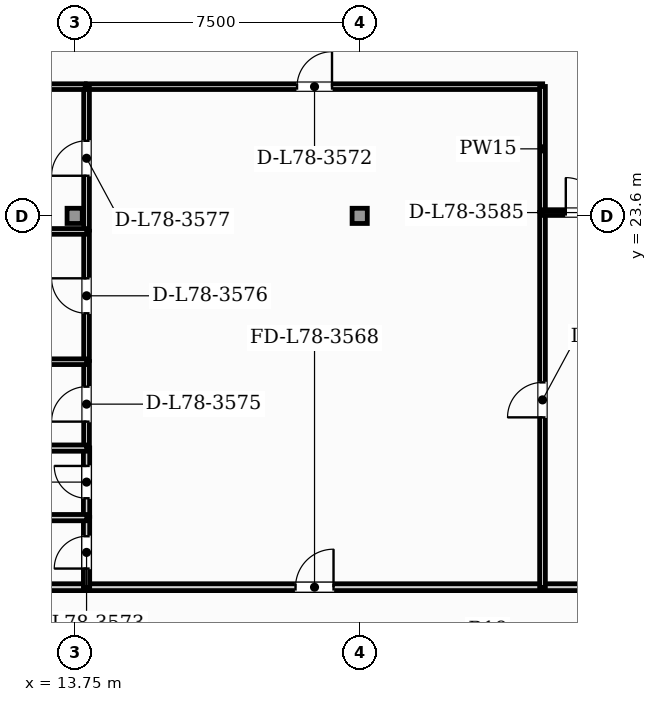
"""IFC4 building model, lengths in metres.
Left out: names, types, materials, properties, quantities, classifications, styles, units other than length and angle.
Written with IfcOpenShell. Run it as: python <this file> out.ifc"""

import sys

from ifc_helpers import new_model, si_unit, direction, frame, frame_2d, origin, origin_2d, place, context, subcontext, project, spatial, rectangle, hollow_rectangle, extrude, element, fill, save


model = new_model("IFC4")
c1 = context("Model", 3, precision=1e-05, world=origin(), true_north=direction((0.0, 1.0)))
c2 = subcontext(c1, "Body", "Model", "MODEL_VIEW")
j1 = project(units=[si_unit("LENGTHUNIT", "METRE"), si_unit("PLANEANGLEUNIT", "RADIAN")], contexts=[c1])
p1 = place(None, origin())
s1 = spatial("IfcSite", under=j1, at=p1, CompositionType="ELEMENT")
p2 = place(p1, origin())
s2 = spatial("IfcBuilding", under=s1, at=p2, CompositionType="ELEMENT")
p3 = place(p2, frame((0.0, 0.0, 316.9)))
s3 = spatial("IfcBuildingStorey", under=s2, at=p3, CompositionType="ELEMENT", Elevation=316.9)
for number, where, z_axis, x_axis in (
    (1, (13.75, 23.6, 0.0), (0.0, 0.0, 1.0), (1.0, 0.0, 0.0)),
    (2, (21.25, 23.6, 0.0), (0.0, 0.0, 1.0), (1.0, 0.0, 0.0)),
):
    element("IfcColumn", number, at=place(p3, frame(where, z_axis=z_axis, x_axis=x_axis)), inside=s3, PredefinedType="COLUMN", context=c2, shape_type="SweptSolid", body=[
        extrude(hollow_rectangle(XDim=0.4, YDim=0.4, WallThickness=0.02, at=origin_2d()), origin(), (0.0, 0.0, 1.0), 3.85),
    ])
p4 = place(p3, frame((14.058, 13.83, 0.0), z_axis=(0.0, 0.0, 1.0), x_axis=(1.0, 0.0, 0.0)))
e3 = element("IfcWall", 3, at=p4, inside=s3, PredefinedType="PARTITIONING", context=c2, shape_type="SweptSolid", body=[
    extrude(rectangle(XDim=12.007, YDim=0.18, at=frame_2d((6.003, 0.0))), origin(), (0.0, 0.0, 1.0), 3.65),
])
p5 = place(p4, frame((5.503, 0.0, 0.0)))
e4 = element("IfcOpeningElement", 4, at=p5, cuts=e3, PredefinedType="OPENING", context=c2, shape_type="SweptSolid", body=[
    extrude(rectangle(XDim=1.0, YDim=2.15, at=frame_2d((0.5, 1.075))), frame((0.0, 0.1, 0.0), z_axis=(0.0, -1.0, 0.0), x_axis=(1.0, 0.0, 0.0)), (0.0, 0.0, 1.0), 0.2),
])
p6 = place(p3, frame((26.095, 13.83, 0.0), z_axis=(0.0, 0.0, 1.0), x_axis=(1.0, 0.0, 0.0)))
e5 = element("IfcWall", 5, at=p6, inside=s3, PredefinedType="PARTITIONING", context=c2, shape_type="SweptSolid", body=[
    extrude(rectangle(XDim=5.31, YDim=0.18, at=frame_2d((2.655, 0.0))), origin(), (0.0, 0.0, 1.0), 3.65),
])
p7 = place(p6, frame((2.155, 0.0, 0.0)))
e6 = element("IfcOpeningElement", 6, at=p7, cuts=e5, PredefinedType="OPENING", context=c2, shape_type="SweptSolid", body=[
    extrude(rectangle(XDim=1.0, YDim=2.15, at=frame_2d((0.5, 1.075))), frame((0.0, 0.1, 0.0), z_axis=(0.0, -1.0, 0.0), x_axis=(1.0, 0.0, 0.0)), (0.0, 0.0, 1.0), 0.2),
])
p8 = place(p3, frame((9.143, 13.83, 0.0), z_axis=(0.0, 0.0, 1.0), x_axis=(1.0, 0.0, 0.0)))
e7 = element("IfcWall", 7, at=p8, inside=s3, PredefinedType="PARTITIONING", context=c2, shape_type="SweptSolid", body=[
    extrude(rectangle(XDim=4.885, YDim=0.18, at=frame_2d((2.443, 0.0))), origin(), (0.0, 0.0, 1.0), 3.65),
])
p9 = place(p3, frame((26.06, 13.825, 0.0), z_axis=(0.0, 0.0, 1.0), x_axis=(0.0, 1.0, 0.0)))
e8 = element("IfcWall", 8, at=p9, inside=s3, PredefinedType="PARTITIONING", context=c2, shape_type="SweptSolid", body=[
    extrude(rectangle(XDim=9.867, YDim=0.15, at=frame_2d((4.934, 0.0))), origin(), (0.0, 0.0, 1.0), 3.65),
])
p10 = place(p9, frame((4.473, 0.0, 0.0)))
e9 = element("IfcOpeningElement", 9, at=p10, cuts=e8, PredefinedType="OPENING", context=c2, shape_type="SweptSolid", body=[
    extrude(rectangle(XDim=0.92, YDim=2.1, at=frame_2d((0.46, 1.05))), frame((0.0, 0.085, 0.0), z_axis=(0.0, -1.0, 0.0), x_axis=(1.0, 0.0, 0.0)), (0.0, 0.0, 1.0), 0.17),
])
p11 = place(p3, frame((14.058, 27.0, 0.0), z_axis=(0.0, 0.0, 1.0), x_axis=(1.0, 0.0, 0.0)))
e10 = element("IfcWall", 10, at=p11, inside=s3, PredefinedType="PARTITIONING", context=c2, shape_type="SweptSolid", body=[
    extrude(rectangle(XDim=12.007, YDim=0.15, at=frame_2d((6.003, 0.0))), origin(), (0.0, 0.0, 1.0), 3.65),
])
p12 = place(p11, frame((5.543, 0.0, 0.0)))
e11 = element("IfcOpeningElement", 11, at=p12, cuts=e10, PredefinedType="OPENING", context=c2, shape_type="SweptSolid", body=[
    extrude(rectangle(XDim=0.92, YDim=2.1, at=frame_2d((0.46, 1.05))), frame((0.0, 0.085, 0.0), z_axis=(0.0, -1.0, 0.0), x_axis=(1.0, 0.0, 0.0)), (0.0, 0.0, 1.0), 0.17),
])
p13 = place(p3, frame((26.06, 23.722, 0.0), z_axis=(0.0, 0.0, 1.0), x_axis=(0.0, 1.0, 0.0)))
e12 = element("IfcWall", 12, at=p13, inside=s3, PredefinedType="PARTITIONING", context=c2, shape_type="SweptSolid", body=[
    extrude(rectangle(XDim=3.283, YDim=0.15, at=frame_2d((1.642, 0.0))), origin(), (0.0, 0.0, 1.0), 3.65),
])
p14 = place(p3, frame((14.063, 13.825, 0.0), z_axis=(0.0, 0.0, 1.0), x_axis=(0.0, 1.0, 0.0)))
e13 = element("IfcWall", 13, at=p14, inside=s3, PredefinedType="PLUMBINGWALL", context=c2, shape_type="SweptSolid", body=[
    extrude(rectangle(XDim=1.84, YDim=0.165, at=frame_2d((0.92, 0.0))), origin(), (0.0, 0.0, 1.0), 3.65),
])
p15 = place(p14, frame((0.495, 0.0, 0.0)))
e14 = element("IfcOpeningElement", 14, at=p15, cuts=e13, PredefinedType="OPENING", context=c2, shape_type="SweptSolid", body=[
    extrude(rectangle(XDim=0.85, YDim=2.1, at=frame_2d((0.425, 1.05))), frame((0.0, 0.093, 0.0), z_axis=(0.0, -1.0, 0.0), x_axis=(1.0, 0.0, 0.0)), (0.0, 0.0, 1.0), 0.185),
])
p16 = place(p3, frame((14.063, 15.695, 0.0), z_axis=(0.0, 0.0, 1.0), x_axis=(0.0, 1.0, 0.0)))
e15 = element("IfcWall", 15, at=p16, inside=s3, PredefinedType="PLUMBINGWALL", context=c2, shape_type="SweptSolid", body=[
    extrude(rectangle(XDim=1.8, YDim=0.165, at=frame_2d((0.9, 0.0))), origin(), (0.0, 0.0, 1.0), 3.65),
])
p17 = place(p16, frame((0.475, 0.0, 0.0)))
e16 = element("IfcOpeningElement", 16, at=p17, cuts=e15, PredefinedType="OPENING", context=c2, shape_type="SweptSolid", body=[
    extrude(rectangle(XDim=0.85, YDim=2.1, at=frame_2d((0.425, 1.05))), frame((0.0, 0.093, 0.0), z_axis=(0.0, -1.0, 0.0), x_axis=(1.0, 0.0, 0.0)), (0.0, 0.0, 1.0), 0.185),
])
p18 = place(p3, frame((14.063, 17.525, 0.0), z_axis=(0.0, 0.0, 1.0), x_axis=(0.0, 1.0, 0.0)))
e17 = element("IfcWall", 17, at=p18, inside=s3, PredefinedType="PARTITIONING", context=c2, shape_type="SweptSolid", body=[
    extrude(rectangle(XDim=2.243, YDim=0.15, at=frame_2d((1.122, 0.0))), origin(), (0.0, 0.0, 1.0), 3.65),
])
p19 = place(p18, frame((0.661, 0.0, 0.0)))
e18 = element("IfcOpeningElement", 18, at=p19, cuts=e17, PredefinedType="OPENING", context=c2, shape_type="SweptSolid", body=[
    extrude(rectangle(XDim=0.92, YDim=2.1, at=frame_2d((0.46, 1.05))), frame((0.0, 0.085, 0.0), z_axis=(0.0, -1.0, 0.0), x_axis=(1.0, 0.0, 0.0)), (0.0, 0.0, 1.0), 0.17),
])
p20 = place(p3, frame((14.063, 19.798, 0.0), z_axis=(0.0, 0.0, 1.0), x_axis=(0.0, 1.0, 0.0)))
e19 = element("IfcWall", 19, at=p20, inside=s3, PredefinedType="PARTITIONING", context=c2, shape_type="SweptSolid", body=[
    extrude(rectangle(XDim=3.398, YDim=0.15, at=frame_2d((1.699, 0.0))), origin(), (0.0, 0.0, 1.0), 3.65),
])
p21 = place(p20, frame((1.239, 0.0, 0.0)))
e20 = element("IfcOpeningElement", 20, at=p21, cuts=e19, PredefinedType="OPENING", context=c2, shape_type="SweptSolid", body=[
    extrude(rectangle(XDim=0.92, YDim=2.1, at=frame_2d((0.46, 1.05))), frame((0.0, 0.085, 0.0), z_axis=(0.0, -1.0, 0.0), x_axis=(1.0, 0.0, 0.0)), (0.0, 0.0, 1.0), 0.17),
])
p22 = place(p3, frame((14.063, 23.226, 0.0), z_axis=(0.0, 0.0, 1.0), x_axis=(0.0, 1.0, 0.0)))
e21 = element("IfcWall", 21, at=p22, inside=s3, PredefinedType="PARTITIONING", context=c2, shape_type="SweptSolid", body=[
    extrude(rectangle(XDim=3.779, YDim=0.15, at=frame_2d((1.889, 0.0))), origin(), (0.0, 0.0, 1.0), 3.65),
])
p23 = place(p22, frame((1.429, 0.0, 0.0)))
e22 = element("IfcOpeningElement", 22, at=p23, cuts=e21, PredefinedType="OPENING", context=c2, shape_type="SweptSolid", body=[
    extrude(rectangle(XDim=0.92, YDim=2.1, at=frame_2d((0.46, 1.05))), frame((0.0, 0.085, 0.0), z_axis=(0.0, -1.0, 0.0), x_axis=(1.0, 0.0, 0.0)), (0.0, 0.0, 1.0), 0.17),
])
p24 = place(p3, frame((26.055, 23.687, 0.0), z_axis=(0.0, 0.0, 1.0), x_axis=(1.0, 0.0, 0.0)))
e23 = element("IfcWall", 23, at=p24, inside=s3, PredefinedType="PARTITIONING", context=c2, shape_type="SweptSolid", body=[
    extrude(rectangle(XDim=5.39, YDim=0.15, at=frame_2d((2.695, 0.0))), origin(), (0.0, 0.0, 1.0), 3.117),
])
p25 = place(p24, frame((0.618, 0.0, 0.0)))
e24 = element("IfcOpeningElement", 24, at=p25, cuts=e23, PredefinedType="OPENING", context=c2, shape_type="SweptSolid", body=[
    extrude(rectangle(XDim=0.92, YDim=2.1, at=frame_2d((0.46, 1.05))), frame((0.0, 0.085, 0.0), z_axis=(0.0, -1.0, 0.0), x_axis=(1.0, 0.0, 0.0)), (0.0, 0.0, 1.0), 0.17),
])
p26 = place(p3, frame((9.143, 27.0, 0.0), z_axis=(0.0, 0.0, 1.0), x_axis=(1.0, 0.0, 0.0)))
e25 = element("IfcWall", 25, at=p26, inside=s3, PredefinedType="PARTITIONING", context=c2, shape_type="SweptSolid", body=[
    extrude(rectangle(XDim=4.885, YDim=0.15, at=frame_2d((2.443, 0.0))), origin(), (0.0, 0.0, 1.0), 3.65),
])
p27 = place(p26, frame((1.983, 0.0, 0.0)))
e26 = element("IfcOpeningElement", 26, at=p27, cuts=e25, PredefinedType="OPENING", context=c2, shape_type="SweptSolid", body=[
    extrude(rectangle(XDim=0.92, YDim=2.1, at=frame_2d((0.46, 1.05))), frame((0.0, 0.085, 0.0), z_axis=(0.0, -1.0, 0.0), x_axis=(1.0, 0.0, 0.0)), (0.0, 0.0, 1.0), 0.17),
])
for number, where, z_axis, x_axis in (
    (27, (9.143, 15.66, 0.0), (0.0, 0.0, 1.0), (1.0, 0.0, 0.0)),
    (28, (9.143, 17.49, 0.0), (0.0, 0.0, 1.0), (1.0, 0.0, 0.0)),
):
    element("IfcWall", number, at=place(p3, frame(where, z_axis=z_axis, x_axis=x_axis)), inside=s3, PredefinedType="PLUMBINGWALL", context=c2, shape_type="SweptSolid", body=[
        extrude(rectangle(XDim=4.926, YDim=0.165, at=frame_2d((2.463, 0.0))), origin(), (0.0, 0.0, 1.0), 3.65),
    ])
for number, where, z_axis, x_axis in (
    (29, (9.143, 19.763, 0.0), (0.0, 0.0, 1.0), (1.0, 0.0, 0.0)),
    (30, (9.143, 23.191, 0.0), (0.0, 0.0, 1.0), (1.0, 0.0, 0.0)),
):
    element("IfcWall", number, at=place(p3, frame(where, z_axis=z_axis, x_axis=x_axis)), inside=s3, PredefinedType="PARTITIONING", context=c2, shape_type="SweptSolid", body=[
        extrude(rectangle(XDim=4.926, YDim=0.15, at=frame_2d((2.463, 0.0))), origin(), (0.0, 0.0, 1.0), 3.65),
    ])
p28 = place(p5, origin())
e31 = element("IfcDoor", 31, at=p28, inside=s3, OperationType="SINGLE_SWING_RIGHT", PredefinedType="DOOR", context=c2, shape_type="SweptSolid", body=[
    extrude(rectangle(XDim=1.0, YDim=2.15, at=frame_2d((0.5, 1.075))), frame((0.0, 0.025, 0.0), z_axis=(0.0, -1.0, 0.0), x_axis=(1.0, 0.0, 0.0)), (0.0, 0.0, 1.0), 0.05),
])
fill(e4, e31)
p29 = place(p10, origin())
e32 = element("IfcDoor", 32, at=p29, inside=s3, OperationType="SINGLE_SWING_LEFT", PredefinedType="DOOR", context=c2, shape_type="SweptSolid", body=[
    extrude(rectangle(XDim=0.92, YDim=2.1, at=frame_2d((0.46, 1.05))), frame((0.0, 0.025, 0.0), z_axis=(0.0, -1.0, 0.0), x_axis=(1.0, 0.0, 0.0)), (0.0, 0.0, 1.0), 0.05),
])
fill(e9, e32)
p30 = place(p12, origin())
e33 = element("IfcDoor", 33, at=p30, inside=s3, OperationType="SINGLE_SWING_RIGHT", PredefinedType="DOOR", context=c2, shape_type="SweptSolid", body=[
    extrude(rectangle(XDim=0.92, YDim=2.1, at=frame_2d((0.46, 1.05))), frame((0.0, 0.025, 0.0), z_axis=(0.0, -1.0, 0.0), x_axis=(1.0, 0.0, 0.0)), (0.0, 0.0, 1.0), 0.05),
])
fill(e11, e33)
p31 = place(p15, origin())
e34 = element("IfcDoor", 34, at=p31, inside=s3, OperationType="SINGLE_SWING_LEFT", PredefinedType="DOOR", context=c2, shape_type="SweptSolid", body=[
    extrude(rectangle(XDim=0.85, YDim=2.1, at=frame_2d((0.425, 1.05))), frame((0.0, 0.025, 0.0), z_axis=(0.0, -1.0, 0.0), x_axis=(1.0, 0.0, 0.0)), (0.0, 0.0, 1.0), 0.05),
])
fill(e14, e34)
p32 = place(p17, origin())
e35 = element("IfcDoor", 35, at=p32, inside=s3, OperationType="SINGLE_SWING_RIGHT", PredefinedType="DOOR", context=c2, shape_type="SweptSolid", body=[
    extrude(rectangle(XDim=0.85, YDim=2.1, at=frame_2d((0.425, 1.05))), frame((0.0, 0.025, 0.0), z_axis=(0.0, -1.0, 0.0), x_axis=(1.0, 0.0, 0.0)), (0.0, 0.0, 1.0), 0.05),
])
fill(e16, e35)
p33 = place(p19, origin())
e36 = element("IfcDoor", 36, at=p33, inside=s3, OperationType="SINGLE_SWING_LEFT", PredefinedType="DOOR", context=c2, shape_type="SweptSolid", body=[
    extrude(rectangle(XDim=0.92, YDim=2.1, at=frame_2d((0.46, 1.05))), frame((0.0, 0.025, 0.0), z_axis=(0.0, -1.0, 0.0), x_axis=(1.0, 0.0, 0.0)), (0.0, 0.0, 1.0), 0.05),
])
fill(e18, e36)
p34 = place(p21, origin())
e37 = element("IfcDoor", 37, at=p34, inside=s3, OperationType="SINGLE_SWING_RIGHT", PredefinedType="DOOR", context=c2, shape_type="SweptSolid", body=[
    extrude(rectangle(XDim=0.92, YDim=2.1, at=frame_2d((0.46, 1.05))), frame((0.0, 0.025, 0.0), z_axis=(0.0, -1.0, 0.0), x_axis=(1.0, 0.0, 0.0)), (0.0, 0.0, 1.0), 0.05),
])
fill(e20, e37)
p35 = place(p23, origin())
e38 = element("IfcDoor", 38, at=p35, inside=s3, OperationType="SINGLE_SWING_LEFT", PredefinedType="DOOR", context=c2, shape_type="SweptSolid", body=[
    extrude(rectangle(XDim=0.92, YDim=2.1, at=frame_2d((0.46, 1.05))), frame((0.0, 0.025, 0.0), z_axis=(0.0, -1.0, 0.0), x_axis=(1.0, 0.0, 0.0)), (0.0, 0.0, 1.0), 0.05),
])
fill(e22, e38)
p36 = place(p25, origin())
e39 = element("IfcDoor", 39, at=p36, inside=s3, OperationType="SINGLE_SWING_LEFT", PredefinedType="DOOR", context=c2, shape_type="SweptSolid", body=[
    extrude(rectangle(XDim=0.92, YDim=2.1, at=frame_2d((0.46, 1.05))), frame((0.0, 0.025, 0.0), z_axis=(0.0, -1.0, 0.0), x_axis=(1.0, 0.0, 0.0)), (0.0, 0.0, 1.0), 0.05),
])
fill(e24, e39)
save(model, sys.argv[1])
